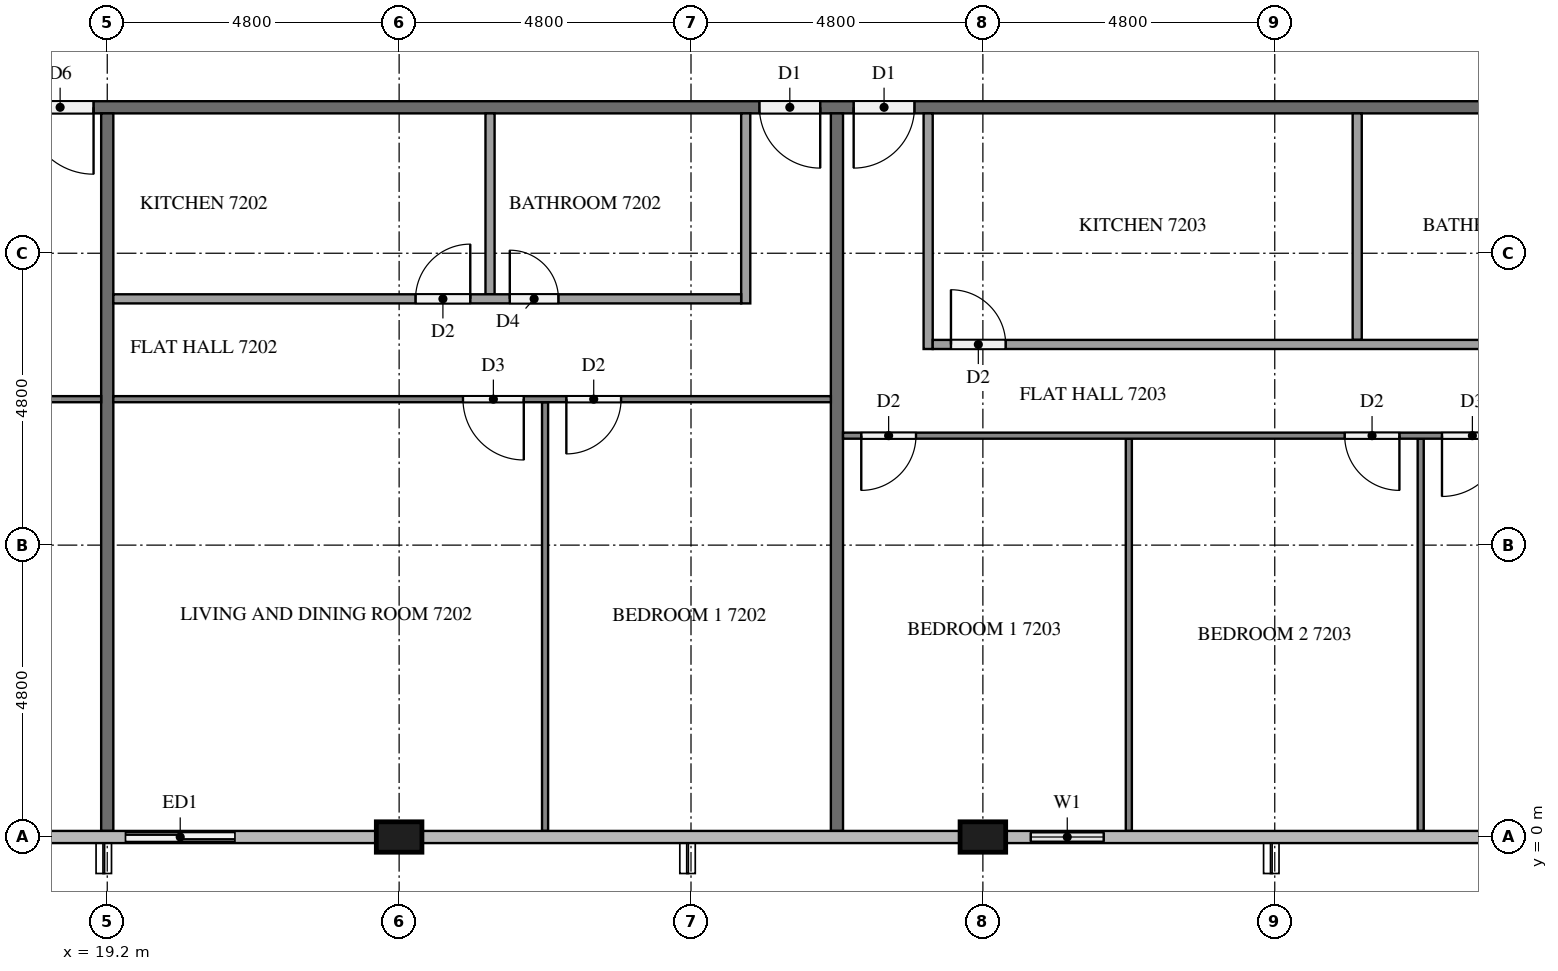
"""IFC4 building model, lengths in metres.
Left out: names, types, materials, properties, quantities, classifications, styles, units other than length and angle.
Written with IfcOpenShell. Run it as: python <this file> out.ifc"""

import sys

from ifc_helpers import new_model, si_unit, direction, frame, frame_2d, origin, origin_2d, place, context, subcontext, project, spatial, rectangle, extrude, element, fill, save


model = new_model("IFC4")
c1 = context("Model", 3, precision=1e-05, world=origin(), true_north=direction((0.0, 1.0)))
c2 = subcontext(c1, "Body", "Model", "MODEL_VIEW")
j1 = project(units=[si_unit("LENGTHUNIT", "METRE"), si_unit("PLANEANGLEUNIT", "RADIAN")], contexts=[c1])
p1 = place(None, origin())
s1 = spatial("IfcSite", under=j1, at=p1, CompositionType="ELEMENT")
p2 = place(p1, origin())
s2 = spatial("IfcBuilding", under=s1, at=p2, CompositionType="ELEMENT")
p3 = place(p2, frame((0.0, 0.0, 275.6)))
s3 = spatial("IfcBuildingStorey", under=s2, at=p3, CompositionType="ELEMENT", Elevation=275.6)
for number, where, z_axis, x_axis in (
    (1, (24.0, 0.0, 0.0), (0.0, 0.0, 1.0), (1.0, 0.0, 0.0)),
    (2, (33.6, 0.0, 0.0), (0.0, 0.0, 1.0), (1.0, 0.0, 0.0)),
):
    element("IfcColumn", number, at=place(p3, frame(where, z_axis=z_axis, x_axis=x_axis)), inside=s3, PredefinedType="COLUMN", context=c2, shape_type="SweptSolid", body=[
        extrude(rectangle(XDim=0.75, YDim=0.5, at=origin_2d()), origin(), (0.0, 0.0, 1.0), 3.2),
    ])
p4 = place(p3, frame((19.2, 0.0, 0.0), z_axis=(0.0, 0.0, 1.0), x_axis=(1.0, 0.0, 0.0)))
e3 = element("IfcWall", 3, at=p4, inside=s3, PredefinedType="SOLIDWALL", context=c2, shape_type="SweptSolid", body=[
    extrude(rectangle(XDim=2.4, YDim=0.15, at=frame_2d((1.2, 0.0))), origin(), (0.0, 0.0, 1.0), 3.2),
])
p5 = place(p4, frame((0.3, 0.0, 0.0)))
e4 = element("IfcOpeningElement", 4, at=p5, cuts=e3, PredefinedType="OPENING", context=c2, shape_type="SweptSolid", body=[
    extrude(rectangle(XDim=1.8, YDim=2.4, at=frame_2d((0.9, 1.2))), frame((0.0, 0.085, 0.0), z_axis=(0.0, -1.0, 0.0), x_axis=(1.0, 0.0, 0.0)), (0.0, 0.0, 1.0), 0.17),
])
p6 = place(p3, frame((33.975, 0.0, 0.0), z_axis=(0.0, 0.0, 1.0), x_axis=(1.0, 0.0, 0.0)))
e5 = element("IfcWall", 5, at=p6, inside=s3, PredefinedType="SOLIDWALL", context=c2, shape_type="SweptSolid", body=[
    extrude(rectangle(XDim=2.025, YDim=0.15, at=frame_2d((1.012, 0.0))), origin(), (0.0, 0.0, 1.0), 3.2),
])
p7 = place(p6, frame((0.413, 0.0, 0.9)))
e6 = element("IfcOpeningElement", 6, at=p7, cuts=e5, PredefinedType="OPENING", context=c2, shape_type="SweptSolid", body=[
    extrude(rectangle(XDim=1.2, YDim=1.4, at=frame_2d((0.6, 0.7))), frame((0.0, 0.085, 0.0), z_axis=(0.0, -1.0, 0.0), x_axis=(1.0, 0.0, 0.0)), (0.0, 0.0, 1.0), 0.17),
])
p8 = place(p3, frame((50.5, 12.0, 0.0), z_axis=(0.0, 0.0, 1.0), x_axis=(-1.0, 0.0, 0.0)))
e7 = element("IfcWall", 7, at=p8, inside=s3, PredefinedType="PARTITIONING", context=c2, shape_type="SweptSolid", body=[
    extrude(rectangle(XDim=38.6, YDim=0.2, at=frame_2d((19.3, 0.0))), origin(), (0.0, 0.0, 1.0), 3.2),
])
p9 = place(p8, frame((31.525, 0.0, 0.0)))
e8 = element("IfcOpeningElement", 8, at=p9, cuts=e7, PredefinedType="OPENING", context=c2, shape_type="SweptSolid", body=[
    extrude(rectangle(XDim=1.1, YDim=2.1, at=frame_2d((0.55, 1.05))), frame((0.0, 0.11, 0.0), z_axis=(0.0, -1.0, 0.0), x_axis=(1.0, 0.0, 0.0)), (0.0, 0.0, 1.0), 0.22),
])
p10 = place(p8, frame((19.575, 0.0, 0.0)))
e9 = element("IfcOpeningElement", 9, at=p10, cuts=e7, PredefinedType="OPENING", context=c2, shape_type="SweptSolid", body=[
    extrude(rectangle(XDim=1.0, YDim=2.1, at=frame_2d((0.5, 1.05))), frame((0.0, 0.11, 0.0), z_axis=(0.0, -1.0, 0.0), x_axis=(1.0, 0.0, 0.0)), (0.0, 0.0, 1.0), 0.22),
])
p11 = place(p8, frame((18.025, 0.0, 0.0)))
e10 = element("IfcOpeningElement", 10, at=p11, cuts=e7, PredefinedType="OPENING", context=c2, shape_type="SweptSolid", body=[
    extrude(rectangle(XDim=1.0, YDim=2.1, at=frame_2d((0.5, 1.05))), frame((0.0, 0.11, 0.0), z_axis=(0.0, -1.0, 0.0), x_axis=(1.0, 0.0, 0.0)), (0.0, 0.0, 1.0), 0.22),
])
p12 = place(p8, frame((1.225, 0.0, 0.0)))
e11 = element("IfcOpeningElement", 11, at=p12, cuts=e7, PredefinedType="OPENING", context=c2, shape_type="SweptSolid", body=[
    extrude(rectangle(XDim=1.0, YDim=2.1, at=frame_2d((0.5, 1.05))), frame((0.0, 0.11, 0.0), z_axis=(0.0, -1.0, 0.0), x_axis=(1.0, 0.0, 0.0)), (0.0, 0.0, 1.0), 0.22),
])
for number, where, z_axis, x_axis in (
    (12, (19.2, 11.9, 0.0), (0.0, 0.0, 1.0), (0.0, -1.0, 0.0)),
    (13, (31.2, 11.9, 0.0), (0.0, 0.0, 1.0), (0.0, -1.0, 0.0)),
):
    element("IfcWall", number, at=place(p3, frame(where, z_axis=z_axis, x_axis=x_axis)), inside=s3, PredefinedType="PARTITIONING", context=c2, shape_type="SweptSolid", body=[
        extrude(rectangle(XDim=11.8, YDim=0.2, at=frame_2d((5.9, 0.0))), origin(), (0.0, 0.0, 1.0), 3.2),
    ])
p13 = place(p3, frame((19.1, 7.2, 0.0), z_axis=(0.0, 0.0, 1.0), x_axis=(-1.0, 0.0, 0.0)))
e14 = element("IfcWall", 14, at=p13, inside=s3, PredefinedType="PARTITIONING", context=c2, shape_type="SweptSolid", body=[
    extrude(rectangle(XDim=19.0, YDim=0.1, at=frame_2d((9.5, 0.0))), origin(), (0.0, 0.0, 1.0), 3.2),
])
p14 = place(p13, frame((3.45, 0.0, 0.0)))
e15 = element("IfcOpeningElement", 15, at=p14, cuts=e14, PredefinedType="OPENING", context=c2, shape_type="SweptSolid", body=[
    extrude(rectangle(XDim=0.9, YDim=2.1, at=frame_2d((0.45, 1.05))), frame((0.0, 0.06, 0.0), z_axis=(0.0, -1.0, 0.0), x_axis=(1.0, 0.0, 0.0)), (0.0, 0.0, 1.0), 0.12),
])
p15 = place(p13, frame((5.05, 0.0, 0.0)))
e16 = element("IfcOpeningElement", 16, at=p15, cuts=e14, PredefinedType="OPENING", context=c2, shape_type="SweptSolid", body=[
    extrude(rectangle(XDim=0.9, YDim=2.1, at=frame_2d((0.45, 1.05))), frame((0.0, 0.06, 0.0), z_axis=(0.0, -1.0, 0.0), x_axis=(1.0, 0.0, 0.0)), (0.0, 0.0, 1.0), 0.12),
])
p16 = place(p13, frame((13.05, 0.0, 0.0)))
e17 = element("IfcOpeningElement", 17, at=p16, cuts=e14, PredefinedType="OPENING", context=c2, shape_type="SweptSolid", body=[
    extrude(rectangle(XDim=0.9, YDim=2.1, at=frame_2d((0.45, 1.05))), frame((0.0, 0.06, 0.0), z_axis=(0.0, -1.0, 0.0), x_axis=(1.0, 0.0, 0.0)), (0.0, 0.0, 1.0), 0.12),
])
p17 = place(p13, frame((14.65, 0.0, 0.0)))
e18 = element("IfcOpeningElement", 18, at=p17, cuts=e14, PredefinedType="OPENING", context=c2, shape_type="SweptSolid", body=[
    extrude(rectangle(XDim=1.0, YDim=2.1, at=frame_2d((0.5, 1.05))), frame((0.0, 0.06, 0.0), z_axis=(0.0, -1.0, 0.0), x_axis=(1.0, 0.0, 0.0)), (0.0, 0.0, 1.0), 0.12),
])
p18 = place(p3, frame((26.4, 7.15, 0.0), z_axis=(0.0, 0.0, 1.0), x_axis=(0.0, -1.0, 0.0)))
e19 = element("IfcWall", 19, at=p18, inside=s3, PredefinedType="PARTITIONING", context=c2, shape_type="SweptSolid", body=[
    extrude(rectangle(XDim=7.05, YDim=0.1, at=frame_2d((3.525, 0.0))), origin(), (0.0, 0.0, 1.0), 3.2),
])
p19 = place(p3, frame((31.1, 7.2, 0.0), z_axis=(0.0, 0.0, 1.0), x_axis=(-1.0, 0.0, 0.0)))
e20 = element("IfcWall", 20, at=p19, inside=s3, PredefinedType="PARTITIONING", context=c2, shape_type="SweptSolid", body=[
    extrude(rectangle(XDim=11.8, YDim=0.1, at=frame_2d((5.9, 0.0))), origin(), (0.0, 0.0, 1.0), 3.2),
])
p20 = place(p19, frame((3.45, 0.0, 0.0)))
e21 = element("IfcOpeningElement", 21, at=p20, cuts=e20, PredefinedType="OPENING", context=c2, shape_type="SweptSolid", body=[
    extrude(rectangle(XDim=0.9, YDim=2.1, at=frame_2d((0.45, 1.05))), frame((0.0, 0.06, 0.0), z_axis=(0.0, -1.0, 0.0), x_axis=(1.0, 0.0, 0.0)), (0.0, 0.0, 1.0), 0.12),
])
p21 = place(p19, frame((5.05, 0.0, 0.0)))
e22 = element("IfcOpeningElement", 22, at=p21, cuts=e20, PredefinedType="OPENING", context=c2, shape_type="SweptSolid", body=[
    extrude(rectangle(XDim=1.0, YDim=2.1, at=frame_2d((0.5, 1.05))), frame((0.0, 0.06, 0.0), z_axis=(0.0, -1.0, 0.0), x_axis=(1.0, 0.0, 0.0)), (0.0, 0.0, 1.0), 0.12),
])
p22 = place(p3, frame((25.495, 11.9, 0.0), z_axis=(0.0, 0.0, 1.0), x_axis=(0.0, -1.0, 0.0)))
e23 = element("IfcWall", 23, at=p22, inside=s3, PredefinedType="PARTITIONING", context=c2, shape_type="SweptSolid", body=[
    extrude(rectangle(XDim=2.975, YDim=0.15, at=frame_2d((1.487, 0.0))), origin(), (0.0, 0.0, 1.0), 3.2),
])
p23 = place(p3, frame((29.7, 11.9, 0.0), z_axis=(0.0, 0.0, 1.0), x_axis=(0.0, -1.0, 0.0)))
e24 = element("IfcWall", 24, at=p23, inside=s3, PredefinedType="PARTITIONING", context=c2, shape_type="SweptSolid", body=[
    extrude(rectangle(XDim=3.125, YDim=0.15, at=frame_2d((1.562, 0.0))), origin(), (0.0, 0.0, 1.0), 3.2),
])
p24 = place(p3, frame((19.3, 8.85, 0.0), z_axis=(0.0, 0.0, 1.0), x_axis=(1.0, 0.0, 0.0)))
e25 = element("IfcWall", 25, at=p24, inside=s3, PredefinedType="PARTITIONING", context=c2, shape_type="SweptSolid", body=[
    extrude(rectangle(XDim=10.325, YDim=0.15, at=frame_2d((5.163, 0.0))), origin(), (0.0, 0.0, 1.0), 3.2),
])
p25 = place(p24, frame((6.52, 0.0, 0.0)))
e26 = element("IfcOpeningElement", 26, at=p25, cuts=e25, PredefinedType="OPENING", context=c2, shape_type="SweptSolid", body=[
    extrude(rectangle(XDim=0.8, YDim=2.1, at=frame_2d((0.4, 1.05))), frame((0.0, 0.085, 0.0), z_axis=(0.0, -1.0, 0.0), x_axis=(1.0, 0.0, 0.0)), (0.0, 0.0, 1.0), 0.17),
])
p26 = place(p24, frame((4.97, 0.0, 0.0)))
e27 = element("IfcOpeningElement", 27, at=p26, cuts=e25, PredefinedType="OPENING", context=c2, shape_type="SweptSolid", body=[
    extrude(rectangle(XDim=0.9, YDim=2.1, at=frame_2d((0.45, 1.05))), frame((0.0, 0.085, 0.0), z_axis=(0.0, -1.0, 0.0), x_axis=(1.0, 0.0, 0.0)), (0.0, 0.0, 1.0), 0.17),
])
for number, where, z_axis, x_axis in (
    (28, (36.0, 6.55, 0.0), (0.0, 0.0, 1.0), (0.0, -1.0, 0.0)),
    (29, (40.8, 6.55, 0.0), (0.0, 0.0, 1.0), (0.0, -1.0, 0.0)),
):
    element("IfcWall", number, at=place(p3, frame(where, z_axis=z_axis, x_axis=x_axis)), inside=s3, PredefinedType="PARTITIONING", context=c2, shape_type="SweptSolid", body=[
        extrude(rectangle(XDim=6.45, YDim=0.1, at=frame_2d((3.225, 0.0))), origin(), (0.0, 0.0, 1.0), 3.2),
    ])
p27 = place(p3, frame((47.9, 6.6, 0.0), z_axis=(0.0, 0.0, 1.0), x_axis=(-1.0, 0.0, 0.0)))
e30 = element("IfcWall", 30, at=p27, inside=s3, PredefinedType="PARTITIONING", context=c2, shape_type="SweptSolid", body=[
    extrude(rectangle(XDim=16.6, YDim=0.1, at=frame_2d((8.3, 0.0))), origin(), (0.0, 0.0, 1.0), 3.2),
])
p28 = place(p27, frame((15.4, 0.0, 0.0)))
e31 = element("IfcOpeningElement", 31, at=p28, cuts=e30, PredefinedType="OPENING", context=c2, shape_type="SweptSolid", body=[
    extrude(rectangle(XDim=0.9, YDim=2.1, at=frame_2d((0.45, 1.05))), frame((0.0, 0.06, 0.0), z_axis=(0.0, -1.0, 0.0), x_axis=(1.0, 0.0, 0.0)), (0.0, 0.0, 1.0), 0.12),
])
p29 = place(p27, frame((7.45, 0.0, 0.0)))
e32 = element("IfcOpeningElement", 32, at=p29, cuts=e30, PredefinedType="OPENING", context=c2, shape_type="SweptSolid", body=[
    extrude(rectangle(XDim=0.9, YDim=2.1, at=frame_2d((0.45, 1.05))), frame((0.0, 0.06, 0.0), z_axis=(0.0, -1.0, 0.0), x_axis=(1.0, 0.0, 0.0)), (0.0, 0.0, 1.0), 0.12),
])
p30 = place(p27, frame((5.75, 0.0, 0.0)))
e33 = element("IfcOpeningElement", 33, at=p30, cuts=e30, PredefinedType="OPENING", context=c2, shape_type="SweptSolid", body=[
    extrude(rectangle(XDim=1.0, YDim=2.1, at=frame_2d((0.5, 1.05))), frame((0.0, 0.06, 0.0), z_axis=(0.0, -1.0, 0.0), x_axis=(1.0, 0.0, 0.0)), (0.0, 0.0, 1.0), 0.12),
])
p31 = place(p3, frame((39.756, 11.9, 0.0), z_axis=(0.0, 0.0, 1.0), x_axis=(0.0, -1.0, 0.0)))
e34 = element("IfcWall", 34, at=p31, inside=s3, PredefinedType="PARTITIONING", context=c2, shape_type="SweptSolid", body=[
    extrude(rectangle(XDim=3.725, YDim=0.15, at=frame_2d((1.862, 0.0))), origin(), (0.0, 0.0, 1.0), 3.2),
])
p32 = place(p3, frame((32.7, 11.9, 0.0), z_axis=(0.0, 0.0, 1.0), x_axis=(0.0, -1.0, 0.0)))
e35 = element("IfcWall", 35, at=p32, inside=s3, PredefinedType="PARTITIONING", context=c2, shape_type="SweptSolid", body=[
    extrude(rectangle(XDim=3.875, YDim=0.15, at=frame_2d((1.938, 0.0))), origin(), (0.0, 0.0, 1.0), 3.2),
])
p33 = place(p3, frame((32.775, 8.1, 0.0), z_axis=(0.0, 0.0, 1.0), x_axis=(1.0, 0.0, 0.0)))
e36 = element("IfcWall", 36, at=p33, inside=s3, PredefinedType="PARTITIONING", context=c2, shape_type="SweptSolid", body=[
    extrude(rectangle(XDim=15.125, YDim=0.15, at=frame_2d((7.562, 0.0))), origin(), (0.0, 0.0, 1.0), 3.2),
])
p34 = place(p33, frame((0.3, 0.0, 0.0)))
e37 = element("IfcOpeningElement", 37, at=p34, cuts=e36, PredefinedType="OPENING", context=c2, shape_type="SweptSolid", body=[
    extrude(rectangle(XDim=0.9, YDim=2.1, at=frame_2d((0.45, 1.05))), frame((0.0, 0.085, 0.0), z_axis=(0.0, -1.0, 0.0), x_axis=(1.0, 0.0, 0.0)), (0.0, 0.0, 1.0), 0.17),
])
p35 = place(p33, frame((10.41, 0.0, 0.0)))
e38 = element("IfcOpeningElement", 38, at=p35, cuts=e36, PredefinedType="OPENING", context=c2, shape_type="SweptSolid", body=[
    extrude(rectangle(XDim=0.9, YDim=2.1, at=frame_2d((0.45, 1.05))), frame((0.0, 0.085, 0.0), z_axis=(0.0, -1.0, 0.0), x_axis=(1.0, 0.0, 0.0)), (0.0, 0.0, 1.0), 0.17),
])
p36 = place(p33, frame((11.96, 0.0, 0.0)))
e39 = element("IfcOpeningElement", 39, at=p36, cuts=e36, PredefinedType="OPENING", context=c2, shape_type="SweptSolid", body=[
    extrude(rectangle(XDim=0.8, YDim=2.1, at=frame_2d((0.4, 1.05))), frame((0.0, 0.085, 0.0), z_axis=(0.0, -1.0, 0.0), x_axis=(1.0, 0.0, 0.0)), (0.0, 0.0, 1.0), 0.17),
])
p37 = place(p5, origin())
e40 = element("IfcDoor", 40, at=p37, inside=s3, OperationType="SLIDING_TO_LEFT", PredefinedType="DOOR", context=c2, shape_type="SweptSolid", body=[
    extrude(rectangle(XDim=1.8, YDim=2.4, at=frame_2d((0.9, 1.2))), frame((0.0, 0.025, 0.0), z_axis=(0.0, -1.0, 0.0), x_axis=(1.0, 0.0, 0.0)), (0.0, 0.0, 1.0), 0.05),
])
fill(e4, e40)
p38 = place(p7, origin())
e41 = element("IfcWindow", 41, at=p38, inside=s3, PartitioningType="SINGLE_PANEL", PredefinedType="WINDOW", context=c2, shape_type="SweptSolid", body=[
    extrude(rectangle(XDim=1.2, YDim=1.4, at=frame_2d((0.6, 0.7))), frame((0.0, 0.03, 0.0), z_axis=(0.0, -1.0, 0.0), x_axis=(1.0, 0.0, 0.0)), (0.0, 0.0, 1.0), 0.06),
])
fill(e6, e41)
p39 = place(p9, origin())
e42 = element("IfcDoor", 42, at=p39, inside=s3, OperationType="SINGLE_SWING_LEFT", PredefinedType="DOOR", context=c2, shape_type="SweptSolid", body=[
    extrude(rectangle(XDim=1.1, YDim=2.1, at=frame_2d((0.55, 1.05))), frame((0.0, 0.025, 0.0), z_axis=(0.0, -1.0, 0.0), x_axis=(1.0, 0.0, 0.0)), (0.0, 0.0, 1.0), 0.05),
])
fill(e8, e42)
p40 = place(p10, origin())
e43 = element("IfcDoor", 43, at=p40, inside=s3, OperationType="SINGLE_SWING_LEFT", PredefinedType="DOOR", context=c2, shape_type="SweptSolid", body=[
    extrude(rectangle(XDim=1.0, YDim=2.1, at=frame_2d((0.5, 1.05))), frame((0.0, 0.025, 0.0), z_axis=(0.0, -1.0, 0.0), x_axis=(1.0, 0.0, 0.0)), (0.0, 0.0, 1.0), 0.05),
])
fill(e9, e43)
p41 = place(p11, origin())
e44 = element("IfcDoor", 44, at=p41, inside=s3, OperationType="SINGLE_SWING_RIGHT", PredefinedType="DOOR", context=c2, shape_type="SweptSolid", body=[
    extrude(rectangle(XDim=1.0, YDim=2.1, at=frame_2d((0.5, 1.05))), frame((0.0, 0.025, 0.0), z_axis=(0.0, -1.0, 0.0), x_axis=(1.0, 0.0, 0.0)), (0.0, 0.0, 1.0), 0.05),
])
fill(e10, e44)
p42 = place(p20, origin())
e45 = element("IfcDoor", 45, at=p42, inside=s3, OperationType="SINGLE_SWING_RIGHT", PredefinedType="DOOR", context=c2, shape_type="SweptSolid", body=[
    extrude(rectangle(XDim=0.9, YDim=2.1, at=frame_2d((0.45, 1.05))), frame((0.0, 0.025, 0.0), z_axis=(0.0, -1.0, 0.0), x_axis=(1.0, 0.0, 0.0)), (0.0, 0.0, 1.0), 0.05),
])
fill(e21, e45)
p43 = place(p21, origin())
e46 = element("IfcDoor", 46, at=p43, inside=s3, OperationType="SINGLE_SWING_LEFT", PredefinedType="DOOR", context=c2, shape_type="SweptSolid", body=[
    extrude(rectangle(XDim=1.0, YDim=2.1, at=frame_2d((0.5, 1.05))), frame((0.0, 0.025, 0.0), z_axis=(0.0, -1.0, 0.0), x_axis=(1.0, 0.0, 0.0)), (0.0, 0.0, 1.0), 0.05),
])
fill(e22, e46)
p44 = place(p25, origin())
e47 = element("IfcDoor", 47, at=p44, inside=s3, OperationType="SINGLE_SWING_LEFT", PredefinedType="DOOR", context=c2, shape_type="SweptSolid", body=[
    extrude(rectangle(XDim=0.8, YDim=2.1, at=frame_2d((0.4, 1.05))), frame((0.0, 0.025, 0.0), z_axis=(0.0, -1.0, 0.0), x_axis=(1.0, 0.0, 0.0)), (0.0, 0.0, 1.0), 0.05),
])
fill(e26, e47)
p45 = place(p26, origin())
e48 = element("IfcDoor", 48, at=p45, inside=s3, OperationType="SINGLE_SWING_RIGHT", PredefinedType="DOOR", context=c2, shape_type="SweptSolid", body=[
    extrude(rectangle(XDim=0.9, YDim=2.1, at=frame_2d((0.45, 1.05))), frame((0.0, 0.025, 0.0), z_axis=(0.0, -1.0, 0.0), x_axis=(1.0, 0.0, 0.0)), (0.0, 0.0, 1.0), 0.05),
])
fill(e27, e48)
p46 = place(p28, origin())
e49 = element("IfcDoor", 49, at=p46, inside=s3, OperationType="SINGLE_SWING_RIGHT", PredefinedType="DOOR", context=c2, shape_type="SweptSolid", body=[
    extrude(rectangle(XDim=0.9, YDim=2.1, at=frame_2d((0.45, 1.05))), frame((0.0, 0.025, 0.0), z_axis=(0.0, -1.0, 0.0), x_axis=(1.0, 0.0, 0.0)), (0.0, 0.0, 1.0), 0.05),
])
fill(e31, e49)
p47 = place(p29, origin())
e50 = element("IfcDoor", 50, at=p47, inside=s3, OperationType="SINGLE_SWING_LEFT", PredefinedType="DOOR", context=c2, shape_type="SweptSolid", body=[
    extrude(rectangle(XDim=0.9, YDim=2.1, at=frame_2d((0.45, 1.05))), frame((0.0, 0.025, 0.0), z_axis=(0.0, -1.0, 0.0), x_axis=(1.0, 0.0, 0.0)), (0.0, 0.0, 1.0), 0.05),
])
fill(e32, e50)
p48 = place(p30, origin())
e51 = element("IfcDoor", 51, at=p48, inside=s3, OperationType="SINGLE_SWING_RIGHT", PredefinedType="DOOR", context=c2, shape_type="SweptSolid", body=[
    extrude(rectangle(XDim=1.0, YDim=2.1, at=frame_2d((0.5, 1.05))), frame((0.0, 0.025, 0.0), z_axis=(0.0, -1.0, 0.0), x_axis=(1.0, 0.0, 0.0)), (0.0, 0.0, 1.0), 0.05),
])
fill(e33, e51)
p49 = place(p34, origin())
e52 = element("IfcDoor", 52, at=p49, inside=s3, OperationType="SINGLE_SWING_LEFT", PredefinedType="DOOR", context=c2, shape_type="SweptSolid", body=[
    extrude(rectangle(XDim=0.9, YDim=2.1, at=frame_2d((0.45, 1.05))), frame((0.0, 0.025, 0.0), z_axis=(0.0, -1.0, 0.0), x_axis=(1.0, 0.0, 0.0)), (0.0, 0.0, 1.0), 0.05),
])
fill(e37, e52)
save(model, sys.argv[1])
